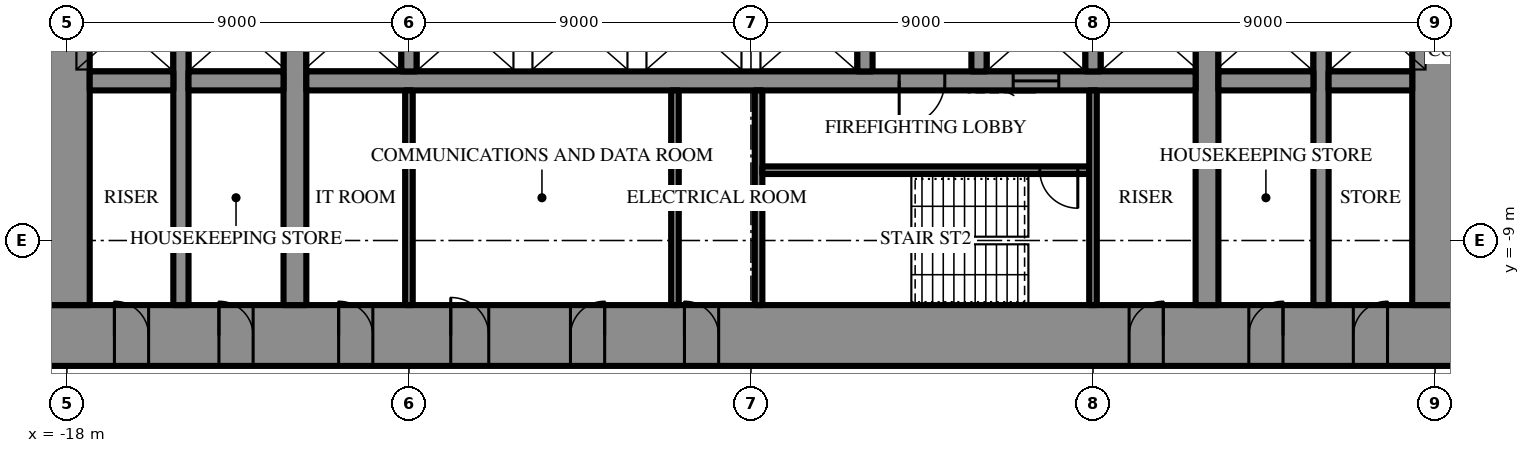
"""IFC4 building model, lengths in metres.
Left out: names, types, materials, properties, quantities, classifications, styles, units other than length and angle.
Written with IfcOpenShell. Run it as: python <this file> out.ifc"""

import sys

from ifc_helpers import new_model, si_unit, direction, frame, frame_2d, origin, place, context, subcontext, project, spatial, rectangle, extrude, element, fill, save


model = new_model("IFC4")
c1 = context("Model", 3, precision=1e-05, world=origin(), true_north=direction((0.0, 1.0)))
c2 = subcontext(c1, "Body", "Model", "MODEL_VIEW")
j1 = project(units=[si_unit("LENGTHUNIT", "METRE"), si_unit("PLANEANGLEUNIT", "RADIAN")], contexts=[c1])
p1 = place(None, origin())
s1 = spatial("IfcSite", under=j1, at=p1, CompositionType="ELEMENT")
p2 = place(p1, origin())
s2 = spatial("IfcBuilding", under=s1, at=p2, CompositionType="ELEMENT")
p3 = place(p2, frame((0.0, 0.0, 57.1)))
s3 = spatial("IfcBuildingStorey", under=s2, at=p3, CompositionType="ELEMENT", Elevation=57.1)
p4 = place(p3, frame((18.6, -11.5, 0.0), z_axis=(0.0, 0.0, 1.0), x_axis=(-1.0, 0.0, 0.0)))
e1 = element("IfcWall", 1, at=p4, inside=s3, PredefinedType="SHEAR", context=c2, shape_type="SweptSolid", body=[
    extrude(rectangle(XDim=37.2, YDim=1.6, at=frame_2d((18.6, 0.0))), origin(), (0.0, 0.0, 1.0), 4.2),
])
p5 = place(p4, frame((19.45, 0.0, 0.0)))
e2 = element("IfcOpeningElement", 2, at=p5, cuts=e1, PredefinedType="OPENING", context=c2, shape_type="SweptSolid", body=[
    extrude(rectangle(XDim=0.9, YDim=2.2, at=frame_2d((0.45, 1.1))), frame((0.0, 0.81, 0.0), z_axis=(0.0, -1.0, 0.0), x_axis=(1.0, 0.0, 0.0)), (0.0, 0.0, 1.0), 1.62),
])
p6 = place(p4, frame((22.45, 0.0, 0.0)))
e3 = element("IfcOpeningElement", 3, at=p6, cuts=e1, PredefinedType="OPENING", context=c2, shape_type="SweptSolid", body=[
    extrude(rectangle(XDim=0.9, YDim=2.2, at=frame_2d((0.45, 1.1))), frame((0.0, 0.81, 0.0), z_axis=(0.0, -1.0, 0.0), x_axis=(1.0, 0.0, 0.0)), (0.0, 0.0, 1.0), 1.62),
])
p7 = place(p4, frame((25.5, 0.0, 0.0)))
e4 = element("IfcOpeningElement", 4, at=p7, cuts=e1, PredefinedType="OPENING", context=c2, shape_type="SweptSolid", body=[
    extrude(rectangle(XDim=1.0, YDim=2.2, at=frame_2d((0.5, 1.1))), frame((0.0, 0.81, 0.0), z_axis=(0.0, -1.0, 0.0), x_axis=(1.0, 0.0, 0.0)), (0.0, 0.0, 1.0), 1.62),
])
p8 = place(p4, frame((1.85, 0.0, 0.0)))
e5 = element("IfcOpeningElement", 5, at=p8, cuts=e1, PredefinedType="OPENING", context=c2, shape_type="SweptSolid", body=[
    extrude(rectangle(XDim=0.9, YDim=2.2, at=frame_2d((0.45, 1.1))), frame((0.0, 0.81, 0.0), z_axis=(0.0, -1.0, 0.0), x_axis=(1.0, 0.0, 0.0)), (0.0, 0.0, 1.0), 1.62),
])
p9 = place(p4, frame((4.6, 0.0, 0.0)))
e6 = element("IfcOpeningElement", 6, at=p9, cuts=e1, PredefinedType="OPENING", context=c2, shape_type="SweptSolid", body=[
    extrude(rectangle(XDim=0.9, YDim=2.2, at=frame_2d((0.45, 1.1))), frame((0.0, 0.81, 0.0), z_axis=(0.0, -1.0, 0.0), x_axis=(1.0, 0.0, 0.0)), (0.0, 0.0, 1.0), 1.62),
])
p10 = place(p4, frame((7.75, 0.0, 0.0)))
e7 = element("IfcOpeningElement", 7, at=p10, cuts=e1, PredefinedType="OPENING", context=c2, shape_type="SweptSolid", body=[
    extrude(rectangle(XDim=0.9, YDim=2.2, at=frame_2d((0.45, 1.1))), frame((0.0, 0.81, 0.0), z_axis=(0.0, -1.0, 0.0), x_axis=(1.0, 0.0, 0.0)), (0.0, 0.0, 1.0), 1.62),
])
p11 = place(p4, frame((28.55, 0.0, 0.0)))
e8 = element("IfcOpeningElement", 8, at=p11, cuts=e1, PredefinedType="OPENING", context=c2, shape_type="SweptSolid", body=[
    extrude(rectangle(XDim=0.9, YDim=2.2, at=frame_2d((0.45, 1.1))), frame((0.0, 0.81, 0.0), z_axis=(0.0, -1.0, 0.0), x_axis=(1.0, 0.0, 0.0)), (0.0, 0.0, 1.0), 1.62),
])
p12 = place(p4, frame((31.7, 0.0, 0.0)))
e9 = element("IfcOpeningElement", 9, at=p12, cuts=e1, PredefinedType="OPENING", context=c2, shape_type="SweptSolid", body=[
    extrude(rectangle(XDim=0.9, YDim=2.2, at=frame_2d((0.45, 1.1))), frame((0.0, 0.81, 0.0), z_axis=(0.0, -1.0, 0.0), x_axis=(1.0, 0.0, 0.0)), (0.0, 0.0, 1.0), 1.62),
])
p13 = place(p4, frame((34.45, 0.0, 0.0)))
e10 = element("IfcOpeningElement", 10, at=p13, cuts=e1, PredefinedType="OPENING", context=c2, shape_type="SweptSolid", body=[
    extrude(rectangle(XDim=0.9, YDim=2.2, at=frame_2d((0.45, 1.1))), frame((0.0, 0.81, 0.0), z_axis=(0.0, -1.0, 0.0), x_axis=(1.0, 0.0, 0.0)), (0.0, 0.0, 1.0), 1.62),
])
p14 = place(p3, frame((18.0, -10.7, 0.0), z_axis=(0.0, 0.0, 1.0), x_axis=(0.0, 1.0, 0.0)))
e11 = element("IfcWall", 11, at=p14, inside=s3, PredefinedType="SHEAR", context=c2, shape_type="SweptSolid", body=[
    extrude(rectangle(XDim=21.4, YDim=1.2, at=frame_2d((10.7, 0.0))), origin(), (0.0, 0.0, 1.0), 4.2),
])
p15 = place(p14, frame((9.8, 0.0, 0.0)))
e12 = element("IfcOpeningElement", 12, at=p15, cuts=e11, PredefinedType="OPENING", context=c2, shape_type="SweptSolid", body=[
    extrude(rectangle(XDim=1.8, YDim=2.4, at=frame_2d((0.9, 1.2))), frame((0.0, 0.61, 0.0), z_axis=(0.0, -1.0, 0.0), x_axis=(1.0, 0.0, 0.0)), (0.0, 0.0, 1.0), 1.22),
])
p16 = place(p3, frame((-18.0, 10.7, 0.0), z_axis=(0.0, 0.0, 1.0), x_axis=(0.0, -1.0, 0.0)))
e13 = element("IfcWall", 13, at=p16, inside=s3, PredefinedType="SHEAR", context=c2, shape_type="SweptSolid", body=[
    extrude(rectangle(XDim=21.4, YDim=1.2, at=frame_2d((10.7, 0.0))), origin(), (0.0, 0.0, 1.0), 4.2),
])
p17 = place(p16, frame((9.8, 0.0, 0.0)))
e14 = element("IfcOpeningElement", 14, at=p17, cuts=e13, PredefinedType="OPENING", context=c2, shape_type="SweptSolid", body=[
    extrude(rectangle(XDim=1.8, YDim=2.4, at=frame_2d((0.9, 1.2))), frame((0.0, 0.61, 0.0), z_axis=(0.0, -1.0, 0.0), x_axis=(1.0, 0.0, 0.0)), (0.0, 0.0, 1.0), 1.22),
])
p18 = place(p3, frame((12.0, -10.7, 0.0), z_axis=(0.0, 0.0, 1.0), x_axis=(0.0, 1.0, 0.0)))
e15 = element("IfcWall", 15, at=p18, inside=s3, PredefinedType="SHEAR", context=c2, shape_type="SweptSolid", body=[
    extrude(rectangle(XDim=21.4, YDim=0.6, at=frame_2d((10.7, 0.0))), origin(), (0.0, 0.0, 1.0), 4.2),
])
p19 = place(p18, frame((9.8, 0.0, 0.0)))
e16 = element("IfcOpeningElement", 16, at=p19, cuts=e15, PredefinedType="OPENING", context=c2, shape_type="SweptSolid", body=[
    extrude(rectangle(XDim=1.8, YDim=2.4, at=frame_2d((0.9, 1.2))), frame((0.0, 0.31, 0.0), z_axis=(0.0, -1.0, 0.0), x_axis=(1.0, 0.0, 0.0)), (0.0, 0.0, 1.0), 0.62),
])
p20 = place(p3, frame((-12.0, -10.7, 0.0), z_axis=(0.0, 0.0, 1.0), x_axis=(0.0, 1.0, 0.0)))
e17 = element("IfcWall", 17, at=p20, inside=s3, PredefinedType="SHEAR", context=c2, shape_type="SweptSolid", body=[
    extrude(rectangle(XDim=21.4, YDim=0.6, at=frame_2d((10.7, 0.0))), origin(), (0.0, 0.0, 1.0), 4.2),
])
p21 = place(p20, frame((9.8, 0.0, 0.0)))
e18 = element("IfcOpeningElement", 18, at=p21, cuts=e17, PredefinedType="OPENING", context=c2, shape_type="SweptSolid", body=[
    extrude(rectangle(XDim=1.8, YDim=2.4, at=frame_2d((0.9, 1.2))), frame((0.0, 0.31, 0.0), z_axis=(0.0, -1.0, 0.0), x_axis=(1.0, 0.0, 0.0)), (0.0, 0.0, 1.0), 0.62),
])
p22 = place(p3, frame((15.0, -10.7, 0.0), z_axis=(0.0, 0.0, 1.0), x_axis=(0.0, 1.0, 0.0)))
e19 = element("IfcWall", 19, at=p22, inside=s3, PredefinedType="SHEAR", context=c2, shape_type="SweptSolid", body=[
    extrude(rectangle(XDim=21.4, YDim=0.4, at=frame_2d((10.7, 0.0))), origin(), (0.0, 0.0, 1.0), 4.2),
])
p23 = place(p22, frame((9.8, 0.0, 0.0)))
e20 = element("IfcOpeningElement", 20, at=p23, cuts=e19, PredefinedType="OPENING", context=c2, shape_type="SweptSolid", body=[
    extrude(rectangle(XDim=1.8, YDim=2.4, at=frame_2d((0.9, 1.2))), frame((0.0, 0.21, 0.0), z_axis=(0.0, -1.0, 0.0), x_axis=(1.0, 0.0, 0.0)), (0.0, 0.0, 1.0), 0.42),
])
p24 = place(p3, frame((-15.0, -10.7, 0.0), z_axis=(0.0, 0.0, 1.0), x_axis=(0.0, 1.0, 0.0)))
e21 = element("IfcWall", 21, at=p24, inside=s3, PredefinedType="SHEAR", context=c2, shape_type="SweptSolid", body=[
    extrude(rectangle(XDim=21.4, YDim=0.4, at=frame_2d((10.7, 0.0))), origin(), (0.0, 0.0, 1.0), 4.2),
])
p25 = place(p24, frame((9.8, 0.0, 0.0)))
e22 = element("IfcOpeningElement", 22, at=p25, cuts=e21, PredefinedType="OPENING", context=c2, shape_type="SweptSolid", body=[
    extrude(rectangle(XDim=1.8, YDim=2.4, at=frame_2d((0.9, 1.2))), frame((0.0, 0.21, 0.0), z_axis=(0.0, -1.0, 0.0), x_axis=(1.0, 0.0, 0.0)), (0.0, 0.0, 1.0), 0.42),
])
p26 = place(p3, frame((17.4, -4.8, 0.0), z_axis=(0.0, 0.0, 1.0), x_axis=(-1.0, 0.0, 0.0)))
e23 = element("IfcWall", 23, at=p26, inside=s3, PredefinedType="SHEAR", context=c2, shape_type="SweptSolid", body=[
    extrude(rectangle(XDim=2.2, YDim=0.5, at=frame_2d((1.1, 0.0))), origin(), (0.0, 0.0, 1.0), 4.2),
])
p27 = place(p3, frame((14.8, -4.8, 0.0), z_axis=(0.0, 0.0, 1.0), x_axis=(-1.0, 0.0, 0.0)))
e24 = element("IfcWall", 24, at=p27, inside=s3, PredefinedType="SHEAR", context=c2, shape_type="SweptSolid", body=[
    extrude(rectangle(XDim=2.5, YDim=0.5, at=frame_2d((1.25, 0.0))), origin(), (0.0, 0.0, 1.0), 4.2),
])
p28 = place(p3, frame((11.7, -4.8, 0.0), z_axis=(0.0, 0.0, 1.0), x_axis=(-1.0, 0.0, 0.0)))
e25 = element("IfcWall", 25, at=p28, inside=s3, PredefinedType="SHEAR", context=c2, shape_type="SweptSolid", body=[
    extrude(rectangle(XDim=23.4, YDim=0.5, at=frame_2d((11.7, 0.0))), origin(), (0.0, 0.0, 1.0), 4.2),
])
p29 = place(p28, frame((6.6, 0.0, 0.0)))
e26 = element("IfcOpeningElement", 26, at=p29, cuts=e25, PredefinedType="OPENING", context=c2, shape_type="SweptSolid", body=[
    extrude(rectangle(XDim=1.2, YDim=2.2, at=frame_2d((0.6, 1.1))), frame((0.0, 0.26, 0.0), z_axis=(0.0, -1.0, 0.0), x_axis=(1.0, 0.0, 0.0)), (0.0, 0.0, 1.0), 0.52),
])
p30 = place(p28, frame((3.6, 0.0, 0.0)))
e27 = element("IfcOpeningElement", 27, at=p30, cuts=e25, PredefinedType="OPENING", context=c2, shape_type="SweptSolid", body=[
    extrude(rectangle(XDim=1.2, YDim=2.2, at=frame_2d((0.6, 1.1))), frame((0.0, 0.26, 0.0), z_axis=(0.0, -1.0, 0.0), x_axis=(1.0, 0.0, 0.0)), (0.0, 0.0, 1.0), 0.52),
])
p31 = place(p3, frame((-12.3, -4.8, 0.0), z_axis=(0.0, 0.0, 1.0), x_axis=(-1.0, 0.0, 0.0)))
e28 = element("IfcWall", 28, at=p31, inside=s3, PredefinedType="SHEAR", context=c2, shape_type="SweptSolid", body=[
    extrude(rectangle(XDim=2.5, YDim=0.5, at=frame_2d((1.25, 0.0))), origin(), (0.0, 0.0, 1.0), 4.2),
])
p32 = place(p3, frame((-15.2, -4.8, 0.0), z_axis=(0.0, 0.0, 1.0), x_axis=(-1.0, 0.0, 0.0)))
e29 = element("IfcWall", 29, at=p32, inside=s3, PredefinedType="SHEAR", context=c2, shape_type="SweptSolid", body=[
    extrude(rectangle(XDim=2.2, YDim=0.5, at=frame_2d((1.1, 0.0))), origin(), (0.0, 0.0, 1.0), 4.2),
])
for number, where, z_axis, x_axis in (
    (30, (9.0, -2.25, 0.0), (0.0, 0.0, 1.0), (0.0, -1.0, 0.0)),
    (31, (6.0, -2.25, 0.0), (0.0, 0.0, 1.0), (0.0, -1.0, 0.0)),
    (32, (3.0, -2.25, 0.0), (0.0, 0.0, 1.0), (0.0, -1.0, 0.0)),
    (33, (-9.0, -2.25, 0.0), (0.0, 0.0, 1.0), (0.0, -1.0, 0.0)),
):
    element("IfcWall", number, at=place(p3, frame(where, z_axis=z_axis, x_axis=x_axis)), inside=s3, PredefinedType="SHEAR", context=c2, shape_type="SweptSolid", body=[
        extrude(rectangle(XDim=2.3, YDim=0.4, at=frame_2d((1.15, 0.0))), origin(), (0.0, 0.0, 1.0), 4.2),
    ])
p33 = place(p3, frame((0.2, -5.05, 0.0), z_axis=(0.0, 0.0, 1.0), x_axis=(0.0, -1.0, 0.0)))
e34 = element("IfcWall", 34, at=p33, inside=s3, PredefinedType="SHEAR", context=c2, shape_type="SweptSolid", body=[
    extrude(rectangle(XDim=5.65, YDim=0.2, at=frame_2d((2.825, 0.0))), origin(), (0.0, 0.0, 1.0), 4.2),
])
p34 = place(p3, frame((8.9, -7.15, 0.0), z_axis=(0.0, 0.0, 1.0), x_axis=(-1.0, 0.0, 0.0)))
e35 = element("IfcWall", 35, at=p34, inside=s3, PredefinedType="SHEAR", context=c2, shape_type="SweptSolid", body=[
    extrude(rectangle(XDim=8.6, YDim=0.2, at=frame_2d((4.3, 0.0))), origin(), (0.0, 0.0, 1.0), 4.2),
])
p35 = place(p34, frame((0.3, 0.0, 0.0)))
e36 = element("IfcOpeningElement", 36, at=p35, cuts=e35, PredefinedType="OPENING", context=c2, shape_type="SweptSolid", body=[
    extrude(rectangle(XDim=1.0, YDim=2.2, at=frame_2d((0.5, 1.1))), frame((0.0, 0.11, 0.0), z_axis=(0.0, -1.0, 0.0), x_axis=(1.0, 0.0, 0.0)), (0.0, 0.0, 1.0), 0.22),
])
for number, where, z_axis, x_axis in (
    (37, (9.0, -5.05, 0.0), (0.0, 0.0, 1.0), (0.0, -1.0, 0.0)),
    (38, (-9.0, -5.05, 0.0), (0.0, 0.0, 1.0), (0.0, -1.0, 0.0)),
    (39, (-2.0, -5.05, 0.0), (0.0, 0.0, 1.0), (0.0, -1.0, 0.0)),
):
    element("IfcWall", number, at=place(p3, frame(where, z_axis=z_axis, x_axis=x_axis)), inside=s3, PredefinedType="PARTITIONING", context=c2, shape_type="SweptSolid", body=[
        extrude(rectangle(XDim=5.65, YDim=0.2, at=frame_2d((2.825, 0.0))), origin(), (0.0, 0.0, 1.0), 4.0),
    ])
p36 = place(p3, frame((17.511, -22.67, 0.0), z_axis=(0.0, 0.0, 1.0), x_axis=(0.500000289772, 0.866025236485, 0.0)))
e40 = element("IfcWall", 40, at=p36, inside=s3, PredefinedType="PARTITIONING", context=c2, shape_type="SweptSolid", body=[
    extrude(rectangle(XDim=21.754, YDim=0.2, at=frame_2d((10.877, 0.0))), origin(), (0.0, 0.0, 1.0), 4.0),
])
p37 = place(p36, frame((4.589, 0.0, 0.0)))
e41 = element("IfcOpeningElement", 41, at=p37, cuts=e40, PredefinedType="OPENING", context=c2, shape_type="SweptSolid", body=[
    extrude(rectangle(XDim=1.8, YDim=2.4, at=frame_2d((0.9, 1.2))), frame((0.0, 0.11, 0.0), z_axis=(0.0, -1.0, 0.0), x_axis=(1.0, 0.0, 0.0)), (0.0, 0.0, 1.0), 0.22),
])
p38 = place(p36, frame((15.366, 0.0, 0.0)))
e42 = element("IfcOpeningElement", 42, at=p38, cuts=e40, PredefinedType="OPENING", context=c2, shape_type="SweptSolid", body=[
    extrude(rectangle(XDim=1.8, YDim=2.4, at=frame_2d((0.9, 1.2))), frame((0.0, 0.11, 0.0), z_axis=(0.0, -1.0, 0.0), x_axis=(1.0, 0.0, 0.0)), (0.0, 0.0, 1.0), 0.22),
])
p39 = place(p29, origin())
e43 = element("IfcDoor", 43, at=p39, inside=s3, OperationType="SINGLE_SWING_LEFT", PredefinedType="DOOR", context=c2, shape_type="SweptSolid", body=[
    extrude(rectangle(XDim=1.2, YDim=2.2, at=frame_2d((0.6, 1.1))), frame((0.0, 0.025, 0.0), z_axis=(0.0, -1.0, 0.0), x_axis=(1.0, 0.0, 0.0)), (0.0, 0.0, 1.0), 0.05),
])
fill(e26, e43)
p40 = place(p35, origin())
e44 = element("IfcDoor", 44, at=p40, inside=s3, OperationType="SINGLE_SWING_RIGHT", PredefinedType="DOOR", context=c2, shape_type="SweptSolid", body=[
    extrude(rectangle(XDim=1.0, YDim=2.2, at=frame_2d((0.5, 1.1))), frame((0.0, 0.025, 0.0), z_axis=(0.0, -1.0, 0.0), x_axis=(1.0, 0.0, 0.0)), (0.0, 0.0, 1.0), 0.05),
])
fill(e36, e44)
p41 = place(p5, frame((0.9, 0.0, 0.0), z_axis=(0.0, 0.0, 1.0), x_axis=(-1.0, 0.0, 0.0)))
e45 = element("IfcDoor", 45, at=p41, inside=s3, OperationType="SINGLE_SWING_RIGHT", PredefinedType="DOOR", context=c2, shape_type="SweptSolid", body=[
    extrude(rectangle(XDim=0.9, YDim=2.2, at=frame_2d((0.45, 1.1))), frame((0.0, 0.025, 0.0), z_axis=(0.0, -1.0, 0.0), x_axis=(1.0, 0.0, 0.0)), (0.0, 0.0, 1.0), 0.05),
])
fill(e2, e45)
p42 = place(p6, frame((0.9, 0.0, 0.0), z_axis=(0.0, 0.0, 1.0), x_axis=(-1.0, 0.0, 0.0)))
e46 = element("IfcDoor", 46, at=p42, inside=s3, OperationType="SINGLE_SWING_LEFT", PredefinedType="DOOR", context=c2, shape_type="SweptSolid", body=[
    extrude(rectangle(XDim=0.9, YDim=2.2, at=frame_2d((0.45, 1.1))), frame((0.0, 0.025, 0.0), z_axis=(0.0, -1.0, 0.0), x_axis=(1.0, 0.0, 0.0)), (0.0, 0.0, 1.0), 0.05),
])
fill(e3, e46)
p43 = place(p7, frame((1.0, 0.0, 0.0), z_axis=(0.0, 0.0, 1.0), x_axis=(-1.0, 0.0, 0.0)))
e47 = element("IfcDoor", 47, at=p43, inside=s3, OperationType="SINGLE_SWING_RIGHT", PredefinedType="DOOR", context=c2, shape_type="SweptSolid", body=[
    extrude(rectangle(XDim=1.0, YDim=2.2, at=frame_2d((0.5, 1.1))), frame((0.0, 0.025, 0.0), z_axis=(0.0, -1.0, 0.0), x_axis=(1.0, 0.0, 0.0)), (0.0, 0.0, 1.0), 0.05),
])
fill(e4, e47)
p44 = place(p8, frame((0.9, 0.0, 0.0), z_axis=(0.0, 0.0, 1.0), x_axis=(-1.0, 0.0, 0.0)))
e48 = element("IfcDoor", 48, at=p44, inside=s3, OperationType="SINGLE_SWING_LEFT", PredefinedType="DOOR", context=c2, shape_type="SweptSolid", body=[
    extrude(rectangle(XDim=0.9, YDim=2.2, at=frame_2d((0.45, 1.1))), frame((0.0, 0.025, 0.0), z_axis=(0.0, -1.0, 0.0), x_axis=(1.0, 0.0, 0.0)), (0.0, 0.0, 1.0), 0.05),
])
fill(e5, e48)
p45 = place(p9, frame((0.9, 0.0, 0.0), z_axis=(0.0, 0.0, 1.0), x_axis=(-1.0, 0.0, 0.0)))
e49 = element("IfcDoor", 49, at=p45, inside=s3, OperationType="SINGLE_SWING_LEFT", PredefinedType="DOOR", context=c2, shape_type="SweptSolid", body=[
    extrude(rectangle(XDim=0.9, YDim=2.2, at=frame_2d((0.45, 1.1))), frame((0.0, 0.025, 0.0), z_axis=(0.0, -1.0, 0.0), x_axis=(1.0, 0.0, 0.0)), (0.0, 0.0, 1.0), 0.05),
])
fill(e6, e49)
p46 = place(p10, frame((0.9, 0.0, 0.0), z_axis=(0.0, 0.0, 1.0), x_axis=(-1.0, 0.0, 0.0)))
e50 = element("IfcDoor", 50, at=p46, inside=s3, OperationType="SINGLE_SWING_LEFT", PredefinedType="DOOR", context=c2, shape_type="SweptSolid", body=[
    extrude(rectangle(XDim=0.9, YDim=2.2, at=frame_2d((0.45, 1.1))), frame((0.0, 0.025, 0.0), z_axis=(0.0, -1.0, 0.0), x_axis=(1.0, 0.0, 0.0)), (0.0, 0.0, 1.0), 0.05),
])
fill(e7, e50)
p47 = place(p11, frame((0.9, 0.0, 0.0), z_axis=(0.0, 0.0, 1.0), x_axis=(-1.0, 0.0, 0.0)))
e51 = element("IfcDoor", 51, at=p47, inside=s3, OperationType="SINGLE_SWING_RIGHT", PredefinedType="DOOR", context=c2, shape_type="SweptSolid", body=[
    extrude(rectangle(XDim=0.9, YDim=2.2, at=frame_2d((0.45, 1.1))), frame((0.0, 0.025, 0.0), z_axis=(0.0, -1.0, 0.0), x_axis=(1.0, 0.0, 0.0)), (0.0, 0.0, 1.0), 0.05),
])
fill(e8, e51)
p48 = place(p12, frame((0.9, 0.0, 0.0), z_axis=(0.0, 0.0, 1.0), x_axis=(-1.0, 0.0, 0.0)))
e52 = element("IfcDoor", 52, at=p48, inside=s3, OperationType="SINGLE_SWING_RIGHT", PredefinedType="DOOR", context=c2, shape_type="SweptSolid", body=[
    extrude(rectangle(XDim=0.9, YDim=2.2, at=frame_2d((0.45, 1.1))), frame((0.0, 0.025, 0.0), z_axis=(0.0, -1.0, 0.0), x_axis=(1.0, 0.0, 0.0)), (0.0, 0.0, 1.0), 0.05),
])
fill(e9, e52)
p49 = place(p13, frame((0.9, 0.0, 0.0), z_axis=(0.0, 0.0, 1.0), x_axis=(-1.0, 0.0, 0.0)))
e53 = element("IfcDoor", 53, at=p49, inside=s3, OperationType="SINGLE_SWING_RIGHT", PredefinedType="DOOR", context=c2, shape_type="SweptSolid", body=[
    extrude(rectangle(XDim=0.9, YDim=2.2, at=frame_2d((0.45, 1.1))), frame((0.0, 0.025, 0.0), z_axis=(0.0, -1.0, 0.0), x_axis=(1.0, 0.0, 0.0)), (0.0, 0.0, 1.0), 0.05),
])
fill(e10, e53)
p50 = place(p30, origin())
e54 = element("IfcDoor", 54, at=p50, inside=s3, OperationType="SLIDING_TO_LEFT", PredefinedType="DOOR", context=c2, shape_type="SweptSolid", body=[
    extrude(rectangle(XDim=1.2, YDim=2.2, at=frame_2d((0.6, 1.1))), frame((0.0, 0.025, 0.0), z_axis=(0.0, -1.0, 0.0), x_axis=(1.0, 0.0, 0.0)), (0.0, 0.0, 1.0), 0.05),
])
fill(e27, e54)
save(model, sys.argv[1])
